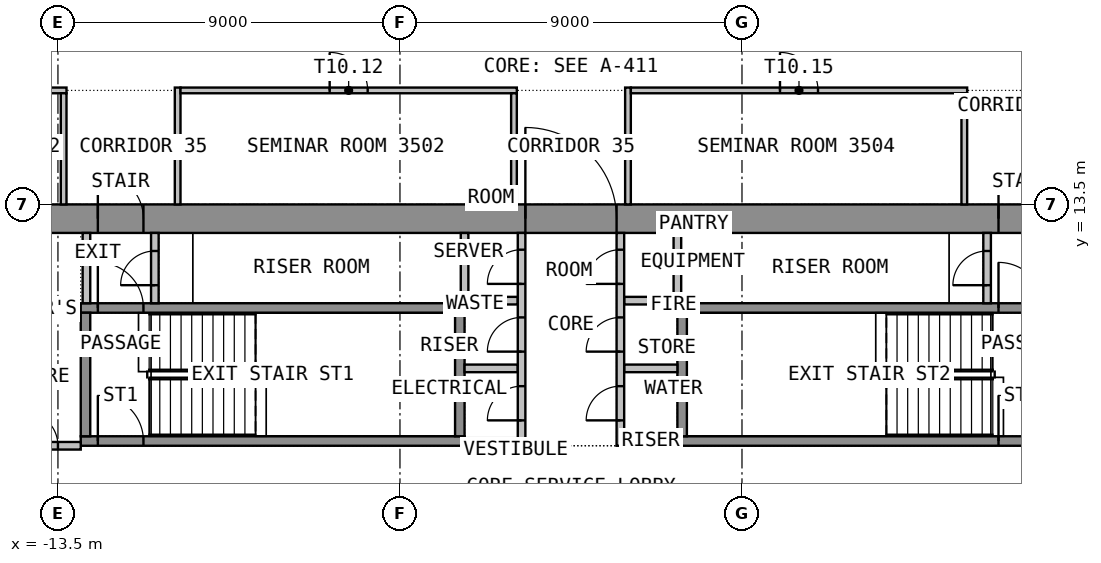
"""IFC4 building model, lengths in metres.
Left out: names, types, materials, properties, quantities, classifications, styles, units other than length and angle.
Written with IfcOpenShell. Run it as: python <this file> out.ifc"""

import sys

from ifc_helpers import new_model, si_unit, direction, frame, frame_2d, origin, place, context, subcontext, project, spatial, rectangle, extrude, element, fill, save


model = new_model("IFC4")
c1 = context("Model", 3, precision=1e-05, world=origin(), true_north=direction((0.0, 1.0)))
c2 = subcontext(c1, "Body", "Model", "MODEL_VIEW")
j1 = project(units=[si_unit("LENGTHUNIT", "METRE"), si_unit("PLANEANGLEUNIT", "RADIAN")], contexts=[c1])
p1 = place(None, origin())
s1 = spatial("IfcSite", under=j1, at=p1, CompositionType="ELEMENT")
p2 = place(p1, origin())
s2 = spatial("IfcBuilding", under=s1, at=p2, CompositionType="ELEMENT")
p3 = place(p2, frame((0.0, 0.0, 144.3)))
s3 = spatial("IfcBuildingStorey", under=s2, at=p3, CompositionType="ELEMENT", Elevation=144.3)
p4 = place(p3, frame((-15.75, 13.125, 0.0), z_axis=(0.0, 0.0, 1.0), x_axis=(1.0, 0.0, 0.0)))
e1 = element("IfcWall", 1, at=p4, inside=s3, PredefinedType="SHEAR", context=c2, shape_type="SweptSolid", body=[
    extrude(rectangle(XDim=31.5, YDim=0.75, at=frame_2d((15.75, 0.0))), origin(), (0.0, 0.0, 1.0), 3.575),
])
p5 = place(p4, frame((14.55, 0.0, 0.0)))
e2 = element("IfcOpeningElement", 2, at=p5, cuts=e1, PredefinedType="OPENING", context=c2, shape_type="SweptSolid", body=[
    extrude(rectangle(XDim=2.4, YDim=2.1, at=frame_2d((1.2, 1.05))), frame((0.0, 0.385, 0.0), z_axis=(0.0, -1.0, 0.0), x_axis=(1.0, 0.0, 0.0)), (0.0, 0.0, 1.0), 0.77),
])
p6 = place(p4, frame((3.3, 0.0, 0.0)))
e3 = element("IfcOpeningElement", 3, at=p6, cuts=e1, PredefinedType="OPENING", context=c2, shape_type="SweptSolid", body=[
    extrude(rectangle(XDim=1.2, YDim=2.1, at=frame_2d((0.6, 1.05))), frame((0.0, 0.385, 0.0), z_axis=(0.0, -1.0, 0.0), x_axis=(1.0, 0.0, 0.0)), (0.0, 0.0, 1.0), 0.77),
])
p7 = place(p4, frame((27.0, 0.0, 0.0)))
e4 = element("IfcOpeningElement", 4, at=p7, cuts=e1, PredefinedType="OPENING", context=c2, shape_type="SweptSolid", body=[
    extrude(rectangle(XDim=1.2, YDim=2.1, at=frame_2d((0.6, 1.05))), frame((0.0, 0.385, 0.0), z_axis=(0.0, -1.0, 0.0), x_axis=(1.0, 0.0, 0.0)), (0.0, 0.0, 1.0), 0.77),
])
p8 = place(p3, frame((-12.9, 7.275, 0.0), z_axis=(0.0, 0.0, 1.0), x_axis=(1.0, 0.0, 0.0)))
e5 = element("IfcWall", 5, at=p8, inside=s3, PredefinedType="SHEAR", context=c2, shape_type="SweptSolid", body=[
    extrude(rectangle(XDim=10.1, YDim=0.25, at=frame_2d((5.05, 0.0))), origin(), (0.0, 0.0, 1.0), 3.575),
])
p9 = place(p8, frame((0.45, 0.0, 0.0)))
e6 = element("IfcOpeningElement", 6, at=p9, cuts=e5, PredefinedType="OPENING", context=c2, shape_type="SweptSolid", body=[
    extrude(rectangle(XDim=1.2, YDim=2.1, at=frame_2d((0.6, 1.05))), frame((0.0, 0.135, 0.0), z_axis=(0.0, -1.0, 0.0), x_axis=(1.0, 0.0, 0.0)), (0.0, 0.0, 1.0), 0.27),
])
p10 = place(p3, frame((-12.9, 10.775, 0.0), z_axis=(0.0, 0.0, 1.0), x_axis=(1.0, 0.0, 0.0)))
e7 = element("IfcWall", 7, at=p10, inside=s3, PredefinedType="SHEAR", context=c2, shape_type="SweptSolid", body=[
    extrude(rectangle(XDim=10.1, YDim=0.25, at=frame_2d((5.05, 0.0))), origin(), (0.0, 0.0, 1.0), 3.575),
])
p11 = place(p10, frame((0.45, 0.0, 0.0)))
e8 = element("IfcOpeningElement", 8, at=p11, cuts=e7, PredefinedType="OPENING", context=c2, shape_type="SweptSolid", body=[
    extrude(rectangle(XDim=1.2, YDim=2.1, at=frame_2d((0.6, 1.05))), frame((0.0, 0.135, 0.0), z_axis=(0.0, -1.0, 0.0), x_axis=(1.0, 0.0, 0.0)), (0.0, 0.0, 1.0), 0.27),
])
for number, where, z_axis, x_axis in (
    (9, (-12.775, 7.4, 0.0), (0.0, 0.0, 1.0), (0.0, 1.0, 0.0)),
    (10, (-2.925, 7.4, 0.0), (0.0, 0.0, 1.0), (0.0, 1.0, 0.0)),
):
    element("IfcWall", number, at=place(p3, frame(where, z_axis=z_axis, x_axis=x_axis)), inside=s3, PredefinedType="SHEAR", context=c2, shape_type="SweptSolid", body=[
        extrude(rectangle(XDim=3.25, YDim=0.25, at=frame_2d((1.625, 0.0))), origin(), (0.0, 0.0, 1.0), 3.575),
    ])
p12 = place(p3, frame((2.8, 7.275, 0.0), z_axis=(0.0, 0.0, 1.0), x_axis=(1.0, 0.0, 0.0)))
e11 = element("IfcWall", 11, at=p12, inside=s3, PredefinedType="SHEAR", context=c2, shape_type="SweptSolid", body=[
    extrude(rectangle(XDim=10.1, YDim=0.25, at=frame_2d((5.05, 0.0))), origin(), (0.0, 0.0, 1.0), 3.575),
])
p13 = place(p12, frame((8.45, 0.0, 0.0)))
e12 = element("IfcOpeningElement", 12, at=p13, cuts=e11, PredefinedType="OPENING", context=c2, shape_type="SweptSolid", body=[
    extrude(rectangle(XDim=1.2, YDim=2.1, at=frame_2d((0.6, 1.05))), frame((0.0, 0.135, 0.0), z_axis=(0.0, -1.0, 0.0), x_axis=(1.0, 0.0, 0.0)), (0.0, 0.0, 1.0), 0.27),
])
p14 = place(p3, frame((2.8, 10.775, 0.0), z_axis=(0.0, 0.0, 1.0), x_axis=(1.0, 0.0, 0.0)))
e13 = element("IfcWall", 13, at=p14, inside=s3, PredefinedType="SHEAR", context=c2, shape_type="SweptSolid", body=[
    extrude(rectangle(XDim=10.1, YDim=0.25, at=frame_2d((5.05, 0.0))), origin(), (0.0, 0.0, 1.0), 3.575),
])
p15 = place(p14, frame((8.45, 0.0, 0.0)))
e14 = element("IfcOpeningElement", 14, at=p15, cuts=e13, PredefinedType="OPENING", context=c2, shape_type="SweptSolid", body=[
    extrude(rectangle(XDim=1.2, YDim=2.1, at=frame_2d((0.6, 1.05))), frame((0.0, 0.135, 0.0), z_axis=(0.0, -1.0, 0.0), x_axis=(1.0, 0.0, 0.0)), (0.0, 0.0, 1.0), 0.27),
])
p16 = place(p3, frame((2.925, 7.4, 0.0), z_axis=(0.0, 0.0, 1.0), x_axis=(0.0, 1.0, 0.0)))
e15 = element("IfcWall", 15, at=p16, inside=s3, PredefinedType="SHEAR", context=c2, shape_type="SweptSolid", body=[
    extrude(rectangle(XDim=3.25, YDim=0.25, at=frame_2d((1.625, 0.0))), origin(), (0.0, 0.0, 1.0), 3.575),
])
for number, where, z_axis, x_axis in (
    (16, (-2.8, 7.25, 0.0), (0.0, 0.0, 1.0), (1.0, 0.0, 0.0)),
    (17, (-2.8, 9.186, 0.0), (0.0, 0.0, 1.0), (1.0, 0.0, 0.0)),
    (18, (-2.8, 10.968, 0.0), (0.0, 0.0, 1.0), (1.0, 0.0, 0.0)),
    (19, (1.4, 7.25, 0.0), (0.0, 0.0, 1.0), (1.0, 0.0, 0.0)),
    (20, (1.4, 9.186, 0.0), (0.0, 0.0, 1.0), (1.0, 0.0, 0.0)),
    (21, (1.4, 10.968, 0.0), (0.0, 0.0, 1.0), (1.0, 0.0, 0.0)),
):
    element("IfcWall", number, at=place(p3, frame(where, z_axis=z_axis, x_axis=x_axis)), inside=s3, PredefinedType="PARTITIONING", context=c2, shape_type="SweptSolid", body=[
        extrude(rectangle(XDim=1.4, YDim=0.2, at=frame_2d((0.7, 0.0))), origin(), (0.0, 0.0, 1.0), 3.575),
    ])
p17 = place(p3, frame((-1.3, 7.15, 0.0), z_axis=(0.0, 0.0, 1.0), x_axis=(0.0, 1.0, 0.0)))
e22 = element("IfcWall", 22, at=p17, inside=s3, PredefinedType="PARTITIONING", context=c2, shape_type="SweptSolid", body=[
    extrude(rectangle(XDim=5.6, YDim=0.2, at=frame_2d((2.8, 0.0))), origin(), (0.0, 0.0, 1.0), 3.575),
])
p18 = place(p17, frame((0.668, 0.0, 0.0)))
e23 = element("IfcOpeningElement", 23, at=p18, cuts=e22, PredefinedType="OPENING", context=c2, shape_type="SweptSolid", body=[
    extrude(rectangle(XDim=0.9, YDim=2.1, at=frame_2d((0.45, 1.05))), frame((0.0, 0.11, 0.0), z_axis=(0.0, -1.0, 0.0), x_axis=(1.0, 0.0, 0.0)), (0.0, 0.0, 1.0), 0.22),
])
p19 = place(p17, frame((2.477, 0.0, 0.0)))
e24 = element("IfcOpeningElement", 24, at=p19, cuts=e22, PredefinedType="OPENING", context=c2, shape_type="SweptSolid", body=[
    extrude(rectangle(XDim=0.9, YDim=2.1, at=frame_2d((0.45, 1.05))), frame((0.0, 0.11, 0.0), z_axis=(0.0, -1.0, 0.0), x_axis=(1.0, 0.0, 0.0)), (0.0, 0.0, 1.0), 0.22),
])
p20 = place(p17, frame((4.259, 0.0, 0.0)))
e25 = element("IfcOpeningElement", 25, at=p20, cuts=e22, PredefinedType="OPENING", context=c2, shape_type="SweptSolid", body=[
    extrude(rectangle(XDim=0.9, YDim=2.1, at=frame_2d((0.45, 1.05))), frame((0.0, 0.11, 0.0), z_axis=(0.0, -1.0, 0.0), x_axis=(1.0, 0.0, 0.0)), (0.0, 0.0, 1.0), 0.22),
])
p21 = place(p3, frame((1.3, 7.15, 0.0), z_axis=(0.0, 0.0, 1.0), x_axis=(0.0, 1.0, 0.0)))
e26 = element("IfcWall", 26, at=p21, inside=s3, PredefinedType="PARTITIONING", context=c2, shape_type="SweptSolid", body=[
    extrude(rectangle(XDim=5.6, YDim=0.2, at=frame_2d((2.8, 0.0))), origin(), (0.0, 0.0, 1.0), 3.575),
])
p22 = place(p21, frame((0.668, 0.0, 0.0)))
e27 = element("IfcOpeningElement", 27, at=p22, cuts=e26, PredefinedType="OPENING", context=c2, shape_type="SweptSolid", body=[
    extrude(rectangle(XDim=0.9, YDim=2.1, at=frame_2d((0.45, 1.05))), frame((0.0, 0.11, 0.0), z_axis=(0.0, -1.0, 0.0), x_axis=(1.0, 0.0, 0.0)), (0.0, 0.0, 1.0), 0.22),
])
p23 = place(p21, frame((2.477, 0.0, 0.0)))
e28 = element("IfcOpeningElement", 28, at=p23, cuts=e26, PredefinedType="OPENING", context=c2, shape_type="SweptSolid", body=[
    extrude(rectangle(XDim=0.9, YDim=2.1, at=frame_2d((0.45, 1.05))), frame((0.0, 0.11, 0.0), z_axis=(0.0, -1.0, 0.0), x_axis=(1.0, 0.0, 0.0)), (0.0, 0.0, 1.0), 0.22),
])
p24 = place(p21, frame((4.259, 0.0, 0.0)))
e29 = element("IfcOpeningElement", 29, at=p24, cuts=e26, PredefinedType="OPENING", context=c2, shape_type="SweptSolid", body=[
    extrude(rectangle(XDim=0.9, YDim=2.1, at=frame_2d((0.45, 1.05))), frame((0.0, 0.11, 0.0), z_axis=(0.0, -1.0, 0.0), x_axis=(1.0, 0.0, 0.0)), (0.0, 0.0, 1.0), 0.22),
])
p25 = place(p3, frame((-12.75, 10.9, 0.0), z_axis=(0.0, 0.0, 1.0), x_axis=(0.0, 1.0, 0.0)))
e30 = element("IfcWall", 30, at=p25, inside=s3, PredefinedType="PARTITIONING", context=c2, shape_type="SweptSolid", body=[
    extrude(rectangle(XDim=1.85, YDim=0.2, at=frame_2d((0.925, 0.0))), origin(), (0.0, 0.0, 1.0), 3.575),
])
p26 = place(p3, frame((-10.95, 10.9, 0.0), z_axis=(0.0, 0.0, 1.0), x_axis=(0.0, 1.0, 0.0)))
e31 = element("IfcWall", 31, at=p26, inside=s3, PredefinedType="PARTITIONING", context=c2, shape_type="SweptSolid", body=[
    extrude(rectangle(XDim=1.85, YDim=0.2, at=frame_2d((0.925, 0.0))), origin(), (0.0, 0.0, 1.0), 3.575),
])
p27 = place(p26, frame((0.475, 0.0, 0.0)))
e32 = element("IfcOpeningElement", 32, at=p27, cuts=e31, PredefinedType="OPENING", context=c2, shape_type="SweptSolid", body=[
    extrude(rectangle(XDim=0.9, YDim=2.1, at=frame_2d((0.45, 1.05))), frame((0.0, 0.11, 0.0), z_axis=(0.0, -1.0, 0.0), x_axis=(1.0, 0.0, 0.0)), (0.0, 0.0, 1.0), 0.22),
])
p28 = place(p3, frame((10.95, 10.9, 0.0), z_axis=(0.0, 0.0, 1.0), x_axis=(0.0, 1.0, 0.0)))
e33 = element("IfcWall", 33, at=p28, inside=s3, PredefinedType="PARTITIONING", context=c2, shape_type="SweptSolid", body=[
    extrude(rectangle(XDim=1.85, YDim=0.2, at=frame_2d((0.925, 0.0))), origin(), (0.0, 0.0, 1.0), 3.575),
])
p29 = place(p28, frame((0.475, 0.0, 0.0)))
e34 = element("IfcOpeningElement", 34, at=p29, cuts=e33, PredefinedType="OPENING", context=c2, shape_type="SweptSolid", body=[
    extrude(rectangle(XDim=0.9, YDim=2.1, at=frame_2d((0.45, 1.05))), frame((0.0, 0.11, 0.0), z_axis=(0.0, -1.0, 0.0), x_axis=(1.0, 0.0, 0.0)), (0.0, 0.0, 1.0), 0.22),
])
p30 = place(p3, frame((-15.0, 7.15, 0.0), z_axis=(0.0, 0.0, 1.0), x_axis=(1.0, 0.0, 0.0)))
e35 = element("IfcWall", 35, at=p30, inside=s3, PredefinedType="PARTITIONING", context=c2, shape_type="SweptSolid", body=[
    extrude(rectangle(XDim=2.1, YDim=0.2, at=frame_2d((1.05, 0.0))), origin(), (0.0, 0.0, 1.0), 3.575),
])
p31 = place(p30, frame((0.6, 0.0, 0.0)))
e36 = element("IfcOpeningElement", 36, at=p31, cuts=e35, PredefinedType="OPENING", context=c2, shape_type="SweptSolid", body=[
    extrude(rectangle(XDim=0.9, YDim=2.1, at=frame_2d((0.45, 1.05))), frame((0.0, 0.11, 0.0), z_axis=(0.0, -1.0, 0.0), x_axis=(1.0, 0.0, 0.0)), (0.0, 0.0, 1.0), 0.22),
])
p32 = place(p3, frame((-18.675, 16.5, 0.0), z_axis=(0.0, 0.0, 1.0), x_axis=(1.0, 0.0, 0.0)))
e37 = element("IfcWall", 37, at=p32, inside=s3, PredefinedType="PARTITIONING", context=c2, shape_type="SweptSolid", body=[
    extrude(rectangle(XDim=5.4, YDim=0.15, at=frame_2d((2.7, 0.0))), origin(), (0.0, 0.0, 1.0), 3.575),
])
p33 = place(p32, frame((2.2, 0.0, 0.0)))
e38 = element("IfcOpeningElement", 38, at=p33, cuts=e37, PredefinedType="OPENING", context=c2, shape_type="SweptSolid", body=[
    extrude(rectangle(XDim=1.0, YDim=2.1, at=frame_2d((0.5, 1.05))), frame((0.0, 0.085, 0.0), z_axis=(0.0, -1.0, 0.0), x_axis=(1.0, 0.0, 0.0)), (0.0, 0.0, 1.0), 0.17),
])
p34 = place(p3, frame((-13.35, 16.425, 0.0), z_axis=(0.0, 0.0, 1.0), x_axis=(0.0, -1.0, 0.0)))
e39 = element("IfcWall", 39, at=p34, inside=s3, PredefinedType="PARTITIONING", context=c2, shape_type="SweptSolid", body=[
    extrude(rectangle(XDim=2.925, YDim=0.15, at=frame_2d((1.462, 0.0))), origin(), (0.0, 0.0, 1.0), 3.575),
])
p35 = place(p3, frame((-10.35, 13.5, 0.0), z_axis=(0.0, 0.0, 1.0), x_axis=(0.0, 1.0, 0.0)))
e40 = element("IfcWall", 40, at=p35, inside=s3, PredefinedType="PARTITIONING", context=c2, shape_type="SweptSolid", body=[
    extrude(rectangle(XDim=3.075, YDim=0.15, at=frame_2d((1.538, 0.0))), origin(), (0.0, 0.0, 1.0), 3.575),
])
p36 = place(p3, frame((-10.275, 16.5, 0.0), z_axis=(0.0, 0.0, 1.0), x_axis=(1.0, 0.0, 0.0)))
e41 = element("IfcWall", 41, at=p36, inside=s3, PredefinedType="PARTITIONING", context=c2, shape_type="SweptSolid", body=[
    extrude(rectangle(XDim=8.85, YDim=0.15, at=frame_2d((4.425, 0.0))), origin(), (0.0, 0.0, 1.0), 3.575),
])
p37 = place(p36, frame((3.925, 0.0, 0.0)))
e42 = element("IfcOpeningElement", 42, at=p37, cuts=e41, PredefinedType="OPENING", context=c2, shape_type="SweptSolid", body=[
    extrude(rectangle(XDim=1.0, YDim=2.1, at=frame_2d((0.5, 1.05))), frame((0.0, 0.085, 0.0), z_axis=(0.0, -1.0, 0.0), x_axis=(1.0, 0.0, 0.0)), (0.0, 0.0, 1.0), 0.17),
])
p38 = place(p3, frame((-1.5, 16.425, 0.0), z_axis=(0.0, 0.0, 1.0), x_axis=(0.0, -1.0, 0.0)))
e43 = element("IfcWall", 43, at=p38, inside=s3, PredefinedType="PARTITIONING", context=c2, shape_type="SweptSolid", body=[
    extrude(rectangle(XDim=2.925, YDim=0.15, at=frame_2d((1.462, 0.0))), origin(), (0.0, 0.0, 1.0), 3.575),
])
p39 = place(p3, frame((1.5, 13.5, 0.0), z_axis=(0.0, 0.0, 1.0), x_axis=(0.0, 1.0, 0.0)))
e44 = element("IfcWall", 44, at=p39, inside=s3, PredefinedType="PARTITIONING", context=c2, shape_type="SweptSolid", body=[
    extrude(rectangle(XDim=3.075, YDim=0.15, at=frame_2d((1.538, 0.0))), origin(), (0.0, 0.0, 1.0), 3.575),
])
p40 = place(p3, frame((1.575, 16.5, 0.0), z_axis=(0.0, 0.0, 1.0), x_axis=(1.0, 0.0, 0.0)))
e45 = element("IfcWall", 45, at=p40, inside=s3, PredefinedType="PARTITIONING", context=c2, shape_type="SweptSolid", body=[
    extrude(rectangle(XDim=8.85, YDim=0.15, at=frame_2d((4.425, 0.0))), origin(), (0.0, 0.0, 1.0), 3.575),
])
p41 = place(p40, frame((3.925, 0.0, 0.0)))
e46 = element("IfcOpeningElement", 46, at=p41, cuts=e45, PredefinedType="OPENING", context=c2, shape_type="SweptSolid", body=[
    extrude(rectangle(XDim=1.0, YDim=2.1, at=frame_2d((0.5, 1.05))), frame((0.0, 0.085, 0.0), z_axis=(0.0, -1.0, 0.0), x_axis=(1.0, 0.0, 0.0)), (0.0, 0.0, 1.0), 0.17),
])
p42 = place(p3, frame((10.35, 16.425, 0.0), z_axis=(0.0, 0.0, 1.0), x_axis=(0.0, -1.0, 0.0)))
e47 = element("IfcWall", 47, at=p42, inside=s3, PredefinedType="PARTITIONING", context=c2, shape_type="SweptSolid", body=[
    extrude(rectangle(XDim=2.925, YDim=0.15, at=frame_2d((1.462, 0.0))), origin(), (0.0, 0.0, 1.0), 3.575),
])
for number, where, z_axis, x_axis in (
    (48, (-2.8, 11.069, 0.0), (0.0, 0.0, 1.0), (0.0, 1.0, 0.0)),
    (49, (2.8, 12.749, 0.0), (0.0, 0.0, 1.0), (0.0, -1.0, 0.0)),
):
    element("IfcWall", number, at=place(p3, frame(where, z_axis=z_axis, x_axis=x_axis)), inside=s3, PredefinedType="PARTITIONING", context=c2, shape_type="SweptSolid", body=[
        extrude(rectangle(XDim=1.68, YDim=0.2, at=frame_2d((0.84, 0.0))), origin(), (0.0, 0.0, 1.0), 3.575),
    ])
p43 = place(p5, origin())
e50 = element("IfcDoor", 50, at=p43, inside=s3, OperationType="DOUBLE_DOOR_DOUBLE_SWING", PredefinedType="DOOR", context=c2, shape_type="SweptSolid", body=[
    extrude(rectangle(XDim=2.4, YDim=2.1, at=frame_2d((1.2, 1.05))), frame((0.0, 0.025, 0.0), z_axis=(0.0, -1.0, 0.0), x_axis=(1.0, 0.0, 0.0)), (0.0, 0.0, 1.0), 0.05),
])
fill(e2, e50)
p44 = place(p6, origin())
e51 = element("IfcDoor", 51, at=p44, inside=s3, OperationType="SINGLE_SWING_RIGHT", PredefinedType="DOOR", context=c2, shape_type="SweptSolid", body=[
    extrude(rectangle(XDim=1.2, YDim=2.1, at=frame_2d((0.6, 1.05))), frame((0.0, 0.025, 0.0), z_axis=(0.0, -1.0, 0.0), x_axis=(1.0, 0.0, 0.0)), (0.0, 0.0, 1.0), 0.05),
])
fill(e3, e51)
p45 = place(p7, origin())
e52 = element("IfcDoor", 52, at=p45, inside=s3, OperationType="SINGLE_SWING_RIGHT", PredefinedType="DOOR", context=c2, shape_type="SweptSolid", body=[
    extrude(rectangle(XDim=1.2, YDim=2.1, at=frame_2d((0.6, 1.05))), frame((0.0, 0.025, 0.0), z_axis=(0.0, -1.0, 0.0), x_axis=(1.0, 0.0, 0.0)), (0.0, 0.0, 1.0), 0.05),
])
fill(e4, e52)
p46 = place(p9, origin())
e53 = element("IfcDoor", 53, at=p46, inside=s3, OperationType="SINGLE_SWING_LEFT", PredefinedType="DOOR", context=c2, shape_type="SweptSolid", body=[
    extrude(rectangle(XDim=1.2, YDim=2.1, at=frame_2d((0.6, 1.05))), frame((0.0, 0.025, 0.0), z_axis=(0.0, -1.0, 0.0), x_axis=(1.0, 0.0, 0.0)), (0.0, 0.0, 1.0), 0.05),
])
fill(e6, e53)
p47 = place(p13, origin())
e54 = element("IfcDoor", 54, at=p47, inside=s3, OperationType="SINGLE_SWING_LEFT", PredefinedType="DOOR", context=c2, shape_type="SweptSolid", body=[
    extrude(rectangle(XDim=1.2, YDim=2.1, at=frame_2d((0.6, 1.05))), frame((0.0, 0.025, 0.0), z_axis=(0.0, -1.0, 0.0), x_axis=(1.0, 0.0, 0.0)), (0.0, 0.0, 1.0), 0.05),
])
fill(e12, e54)
p48 = place(p18, origin())
e55 = element("IfcDoor", 55, at=p48, inside=s3, OperationType="SINGLE_SWING_LEFT", PredefinedType="DOOR", context=c2, shape_type="SweptSolid", body=[
    extrude(rectangle(XDim=0.9, YDim=2.1, at=frame_2d((0.45, 1.05))), frame((0.0, 0.025, 0.0), z_axis=(0.0, -1.0, 0.0), x_axis=(1.0, 0.0, 0.0)), (0.0, 0.0, 1.0), 0.05),
])
fill(e23, e55)
p49 = place(p19, origin())
e56 = element("IfcDoor", 56, at=p49, inside=s3, OperationType="SINGLE_SWING_LEFT", PredefinedType="DOOR", context=c2, shape_type="SweptSolid", body=[
    extrude(rectangle(XDim=0.9, YDim=2.1, at=frame_2d((0.45, 1.05))), frame((0.0, 0.025, 0.0), z_axis=(0.0, -1.0, 0.0), x_axis=(1.0, 0.0, 0.0)), (0.0, 0.0, 1.0), 0.05),
])
fill(e24, e56)
p50 = place(p20, origin())
e57 = element("IfcDoor", 57, at=p50, inside=s3, OperationType="SINGLE_SWING_LEFT", PredefinedType="DOOR", context=c2, shape_type="SweptSolid", body=[
    extrude(rectangle(XDim=0.9, YDim=2.1, at=frame_2d((0.45, 1.05))), frame((0.0, 0.025, 0.0), z_axis=(0.0, -1.0, 0.0), x_axis=(1.0, 0.0, 0.0)), (0.0, 0.0, 1.0), 0.05),
])
fill(e25, e57)
p51 = place(p22, origin())
e58 = element("IfcDoor", 58, at=p51, inside=s3, OperationType="SINGLE_SWING_LEFT", PredefinedType="DOOR", context=c2, shape_type="SweptSolid", body=[
    extrude(rectangle(XDim=0.9, YDim=2.1, at=frame_2d((0.45, 1.05))), frame((0.0, 0.025, 0.0), z_axis=(0.0, -1.0, 0.0), x_axis=(1.0, 0.0, 0.0)), (0.0, 0.0, 1.0), 0.05),
])
fill(e27, e58)
p52 = place(p23, origin())
e59 = element("IfcDoor", 59, at=p52, inside=s3, OperationType="SINGLE_SWING_LEFT", PredefinedType="DOOR", context=c2, shape_type="SweptSolid", body=[
    extrude(rectangle(XDim=0.9, YDim=2.1, at=frame_2d((0.45, 1.05))), frame((0.0, 0.025, 0.0), z_axis=(0.0, -1.0, 0.0), x_axis=(1.0, 0.0, 0.0)), (0.0, 0.0, 1.0), 0.05),
])
fill(e28, e59)
p53 = place(p24, origin())
e60 = element("IfcDoor", 60, at=p53, inside=s3, OperationType="SINGLE_SWING_LEFT", PredefinedType="DOOR", context=c2, shape_type="SweptSolid", body=[
    extrude(rectangle(XDim=0.9, YDim=2.1, at=frame_2d((0.45, 1.05))), frame((0.0, 0.025, 0.0), z_axis=(0.0, -1.0, 0.0), x_axis=(1.0, 0.0, 0.0)), (0.0, 0.0, 1.0), 0.05),
])
fill(e29, e60)
p54 = place(p11, origin())
e61 = element("IfcDoor", 61, at=p54, inside=s3, OperationType="SINGLE_SWING_RIGHT", PredefinedType="DOOR", context=c2, shape_type="SweptSolid", body=[
    extrude(rectangle(XDim=1.2, YDim=2.1, at=frame_2d((0.6, 1.05))), frame((0.0, 0.025, 0.0), z_axis=(0.0, -1.0, 0.0), x_axis=(1.0, 0.0, 0.0)), (0.0, 0.0, 1.0), 0.05),
])
fill(e8, e61)
p55 = place(p27, origin())
e62 = element("IfcDoor", 62, at=p55, inside=s3, OperationType="SINGLE_SWING_LEFT", PredefinedType="DOOR", context=c2, shape_type="SweptSolid", body=[
    extrude(rectangle(XDim=0.9, YDim=2.1, at=frame_2d((0.45, 1.05))), frame((0.0, 0.025, 0.0), z_axis=(0.0, -1.0, 0.0), x_axis=(1.0, 0.0, 0.0)), (0.0, 0.0, 1.0), 0.05),
])
fill(e32, e62)
p56 = place(p15, origin())
e63 = element("IfcDoor", 63, at=p56, inside=s3, OperationType="SINGLE_SWING_RIGHT", PredefinedType="DOOR", context=c2, shape_type="SweptSolid", body=[
    extrude(rectangle(XDim=1.2, YDim=2.1, at=frame_2d((0.6, 1.05))), frame((0.0, 0.025, 0.0), z_axis=(0.0, -1.0, 0.0), x_axis=(1.0, 0.0, 0.0)), (0.0, 0.0, 1.0), 0.05),
])
fill(e14, e63)
p57 = place(p29, origin())
e64 = element("IfcDoor", 64, at=p57, inside=s3, OperationType="SINGLE_SWING_LEFT", PredefinedType="DOOR", context=c2, shape_type="SweptSolid", body=[
    extrude(rectangle(XDim=0.9, YDim=2.1, at=frame_2d((0.45, 1.05))), frame((0.0, 0.025, 0.0), z_axis=(0.0, -1.0, 0.0), x_axis=(1.0, 0.0, 0.0)), (0.0, 0.0, 1.0), 0.05),
])
fill(e34, e64)
p58 = place(p31, origin())
e65 = element("IfcDoor", 65, at=p58, inside=s3, OperationType="SINGLE_SWING_LEFT", PredefinedType="DOOR", context=c2, shape_type="SweptSolid", body=[
    extrude(rectangle(XDim=0.9, YDim=2.1, at=frame_2d((0.45, 1.05))), frame((0.0, 0.025, 0.0), z_axis=(0.0, -1.0, 0.0), x_axis=(1.0, 0.0, 0.0)), (0.0, 0.0, 1.0), 0.05),
])
fill(e36, e65)
p59 = place(p37, origin())
e66 = element("IfcDoor", 66, at=p59, inside=s3, OperationType="SINGLE_SWING_LEFT", PredefinedType="DOOR", context=c2, shape_type="SweptSolid", body=[
    extrude(rectangle(XDim=1.0, YDim=2.1, at=frame_2d((0.5, 1.05))), frame((0.0, 0.025, 0.0), z_axis=(0.0, -1.0, 0.0), x_axis=(1.0, 0.0, 0.0)), (0.0, 0.0, 1.0), 0.05),
])
fill(e42, e66)
p60 = place(p41, origin())
e67 = element("IfcDoor", 67, at=p60, inside=s3, OperationType="SINGLE_SWING_LEFT", PredefinedType="DOOR", context=c2, shape_type="SweptSolid", body=[
    extrude(rectangle(XDim=1.0, YDim=2.1, at=frame_2d((0.5, 1.05))), frame((0.0, 0.025, 0.0), z_axis=(0.0, -1.0, 0.0), x_axis=(1.0, 0.0, 0.0)), (0.0, 0.0, 1.0), 0.05),
])
fill(e46, e67)
save(model, sys.argv[1])
